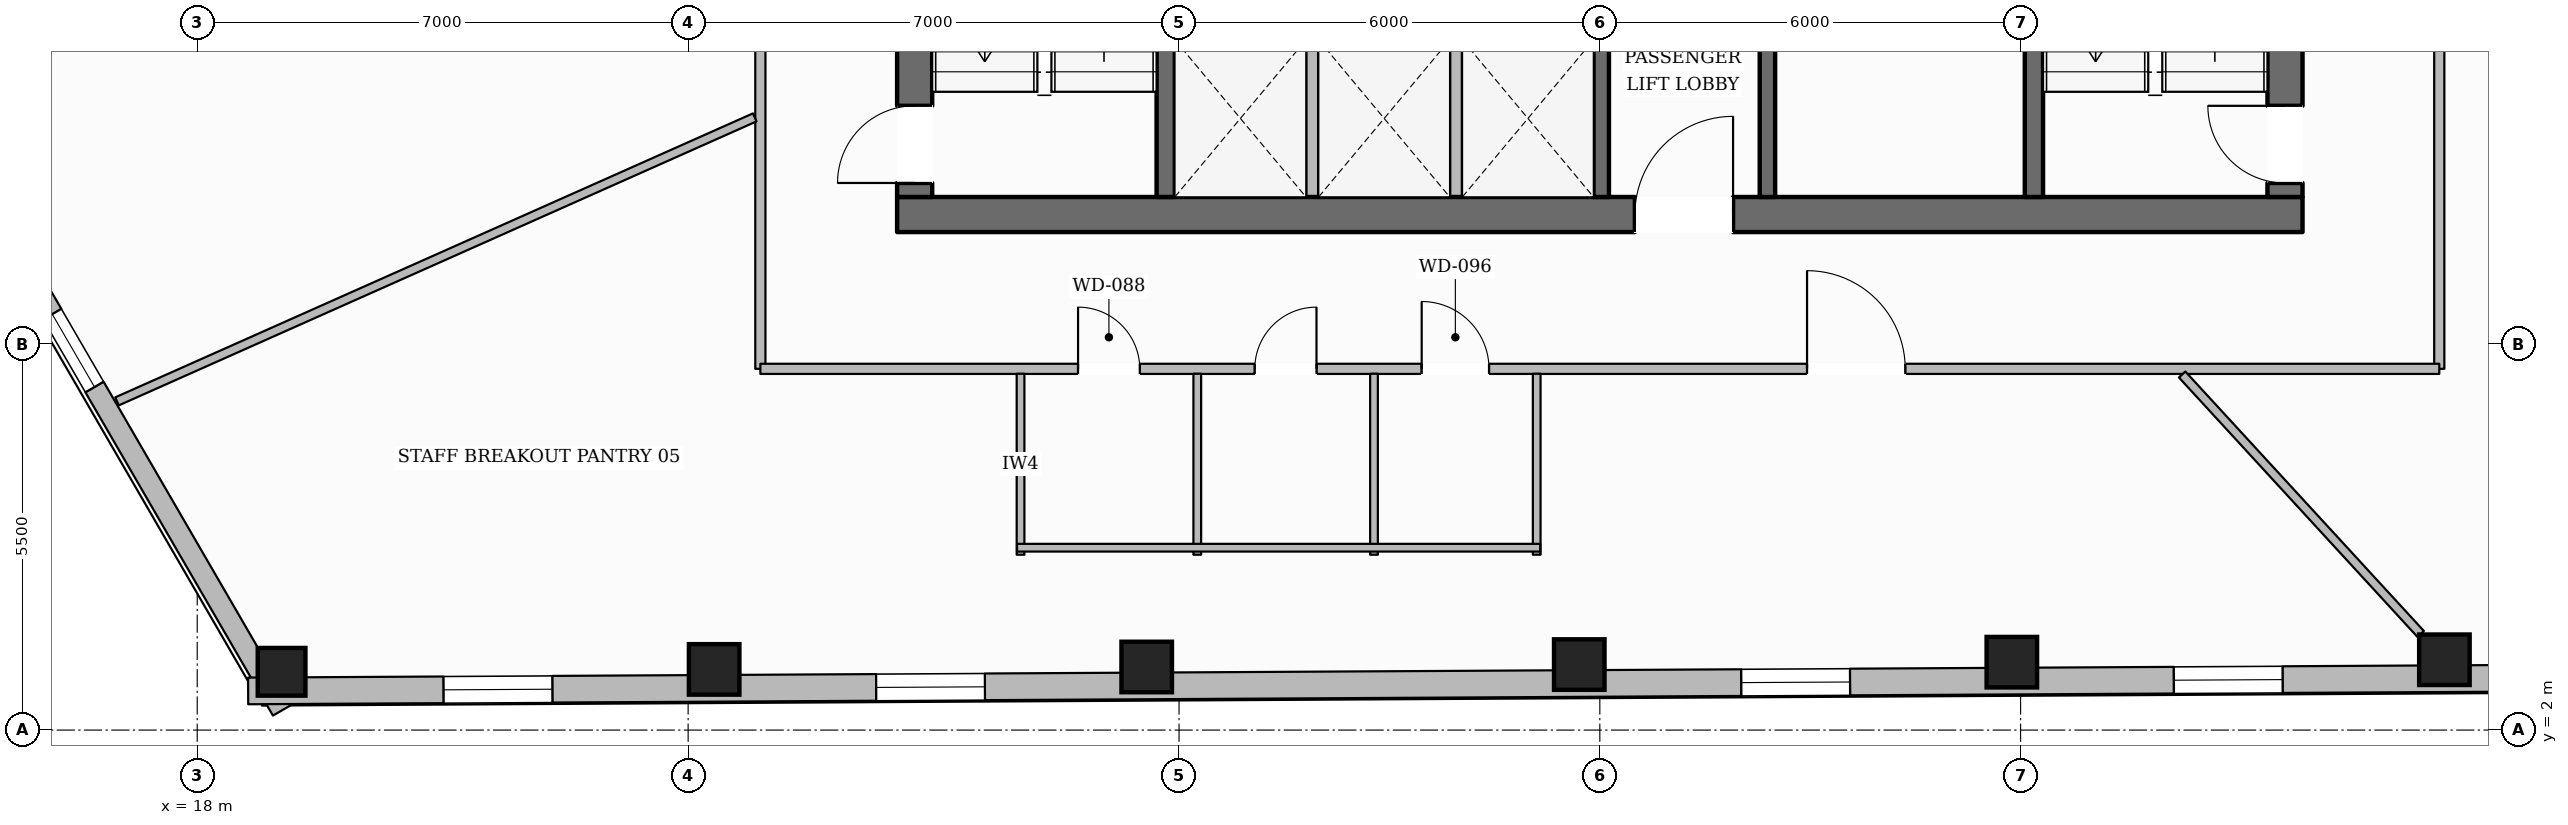
"""IFC4 building model, lengths in metres.
Left out: names, types, materials, properties, quantities, classifications, styles, units other than length and angle.
Written with IfcOpenShell. Run it as: python <this file> out.ifc"""

import sys

from ifc_helpers import new_model, si_unit, direction, frame, frame_2d, origin, origin_2d, place, context, subcontext, project, spatial, rectangle, hollow_rectangle, extrude, element, fill, save


model = new_model("IFC4")
c1 = context("Model", 3, precision=1e-05, world=origin(), true_north=direction((0.0, 1.0)))
c2 = subcontext(c1, "Body", "Model", "MODEL_VIEW")
j1 = project(units=[si_unit("LENGTHUNIT", "METRE"), si_unit("PLANEANGLEUNIT", "RADIAN")], contexts=[c1])
p1 = place(None, origin())
s1 = spatial("IfcSite", under=j1, at=p1, CompositionType="ELEMENT")
p2 = place(p1, origin())
s2 = spatial("IfcBuilding", under=s1, at=p2, CompositionType="ELEMENT")
p3 = place(p2, frame((0.0, 0.0, 139.4)))
s3 = spatial("IfcBuildingStorey", under=s2, at=p3, CompositionType="ELEMENT", Elevation=139.4)
p4 = place(p3, frame((27.98, 9.35, 0.0), z_axis=(0.0, 0.0, 1.0), x_axis=(1.0, 0.0, 0.0)))
e1 = element("IfcWall", 1, at=p4, inside=s3, PredefinedType="SOLIDWALL", context=c2, shape_type="SweptSolid", body=[
    extrude(rectangle(XDim=20.04, YDim=0.5, at=frame_2d((10.02, 0.0))), origin(), (0.0, 0.0, 1.0), 3.6),
])
p5 = place(p4, frame((10.52, 0.0, 0.0)))
e2 = element("IfcOpeningElement", 2, at=p5, cuts=e1, PredefinedType="OPENING", context=c2, shape_type="SweptSolid", body=[
    extrude(rectangle(XDim=1.4, YDim=2.2, at=frame_2d((0.7, 1.1))), frame((0.0, 0.26, 0.0), z_axis=(0.0, -1.0, 0.0), x_axis=(1.0, 0.0, 0.0)), (0.0, 0.0, 1.0), 0.52),
])
p6 = place(p3, frame((28.23, 9.6, 0.0), z_axis=(0.0, 0.0, 1.0), x_axis=(0.0, 1.0, 0.0)))
e3 = element("IfcWall", 3, at=p6, inside=s3, PredefinedType="SOLIDWALL", context=c2, shape_type="SweptSolid", body=[
    extrude(rectangle(XDim=13.0, YDim=0.5, at=frame_2d((6.5, 0.0))), origin(), (0.0, 0.0, 1.0), 3.6),
])
p7 = place(p6, frame((0.2, 0.0, 0.0)))
e4 = element("IfcOpeningElement", 4, at=p7, cuts=e3, PredefinedType="OPENING", context=c2, shape_type="SweptSolid", body=[
    extrude(rectangle(XDim=1.1, YDim=2.15, at=frame_2d((0.55, 1.075))), frame((0.0, 0.26, 0.0), z_axis=(0.0, -1.0, 0.0), x_axis=(1.0, 0.0, 0.0)), (0.0, 0.0, 1.0), 0.52),
])
p8 = place(p6, frame((8.4, 0.0, 0.0)))
e5 = element("IfcOpeningElement", 5, at=p8, cuts=e3, PredefinedType="OPENING", context=c2, shape_type="SweptSolid", body=[
    extrude(rectangle(XDim=0.9, YDim=2.1, at=frame_2d((0.45, 1.05))), frame((0.0, 0.26, 0.0), z_axis=(0.0, -1.0, 0.0), x_axis=(1.0, 0.0, 0.0)), (0.0, 0.0, 1.0), 0.52),
])
p9 = place(p3, frame((47.77, 9.6, 0.0), z_axis=(0.0, 0.0, 1.0), x_axis=(0.0, 1.0, 0.0)))
e6 = element("IfcWall", 6, at=p9, inside=s3, PredefinedType="SOLIDWALL", context=c2, shape_type="SweptSolid", body=[
    extrude(rectangle(XDim=13.0, YDim=0.5, at=frame_2d((6.5, 0.0))), origin(), (0.0, 0.0, 1.0), 3.6),
])
p10 = place(p9, frame((0.2, 0.0, 0.0)))
e7 = element("IfcOpeningElement", 7, at=p10, cuts=e6, PredefinedType="OPENING", context=c2, shape_type="SweptSolid", body=[
    extrude(rectangle(XDim=1.1, YDim=2.15, at=frame_2d((0.55, 1.075))), frame((0.0, 0.26, 0.0), z_axis=(0.0, -1.0, 0.0), x_axis=(1.0, 0.0, 0.0)), (0.0, 0.0, 1.0), 0.52),
])
p11 = place(p9, frame((8.4, 0.0, 0.0)))
e8 = element("IfcOpeningElement", 8, at=p11, cuts=e6, PredefinedType="OPENING", context=c2, shape_type="SweptSolid", body=[
    extrude(rectangle(XDim=0.9, YDim=2.1, at=frame_2d((0.45, 1.05))), frame((0.0, 0.26, 0.0), z_axis=(0.0, -1.0, 0.0), x_axis=(1.0, 0.0, 0.0)), (0.0, 0.0, 1.0), 0.52),
])
p12 = place(p3, frame((31.81, 9.6, 0.0), z_axis=(0.0, 0.0, 1.0), x_axis=(0.0, 1.0, 0.0)))
e9 = element("IfcWall", 9, at=p12, inside=s3, PredefinedType="SHEAR", context=c2, shape_type="SweptSolid", body=[
    extrude(rectangle(XDim=13.0, YDim=0.26, at=frame_2d((6.5, 0.0))), origin(), (0.0, 0.0, 1.0), 3.6),
])
p13 = place(p12, frame((10.925, 0.0, 0.0)))
e10 = element("IfcOpeningElement", 10, at=p13, cuts=e9, PredefinedType="OPENING", context=c2, shape_type="SweptSolid", body=[
    extrude(rectangle(XDim=1.25, YDim=2.25, at=frame_2d((0.625, 1.125))), frame((0.0, 0.14, 0.0), z_axis=(0.0, -1.0, 0.0), x_axis=(1.0, 0.0, 0.0)), (0.0, 0.0, 1.0), 0.28),
])
p14 = place(p3, frame((44.19, 9.6, 0.0), z_axis=(0.0, 0.0, 1.0), x_axis=(0.0, 1.0, 0.0)))
e11 = element("IfcWall", 11, at=p14, inside=s3, PredefinedType="SHEAR", context=c2, shape_type="SweptSolid", body=[
    extrude(rectangle(XDim=13.0, YDim=0.26, at=frame_2d((6.5, 0.0))), origin(), (0.0, 0.0, 1.0), 3.6),
])
p15 = place(p14, frame((10.925, 0.0, 0.0)))
e12 = element("IfcOpeningElement", 12, at=p15, cuts=e11, PredefinedType="OPENING", context=c2, shape_type="SweptSolid", body=[
    extrude(rectangle(XDim=1.25, YDim=2.25, at=frame_2d((0.625, 1.125))), frame((0.0, 0.14, 0.0), z_axis=(0.0, -1.0, 0.0), x_axis=(1.0, 0.0, 0.0)), (0.0, 0.0, 1.0), 0.28),
])
for number, where, z_axis, x_axis in (
    (13, (38.02, 9.6, 0.0), (0.0, 0.0, 1.0), (0.0, 1.0, 0.0)),
    (14, (40.39, 9.6, 0.0), (0.0, 0.0, 1.0), (0.0, 1.0, 0.0)),
):
    element("IfcWall", number, at=place(p3, frame(where, z_axis=z_axis, x_axis=x_axis)), inside=s3, PredefinedType="SOLIDWALL", context=c2, shape_type="SweptSolid", body=[
        extrude(rectangle(XDim=2.24, YDim=0.22, at=frame_2d((1.12, 0.0))), origin(), (0.0, 0.0, 1.0), 3.6),
    ])
p16 = place(p3, frame((19.203, 2.831, 0.0), z_axis=(0.0, 0.0, 1.0), x_axis=(1.0, 0.0, 0.0)))
e15 = element("IfcColumn", 15, at=p16, inside=s3, PredefinedType="COLUMN", context=c2, shape_type="SweptSolid", body=[
    extrude(hollow_rectangle(XDim=0.68, YDim=0.68, WallThickness=0.03, at=origin_2d()), origin(), (0.0, 0.0, 1.0), 3.6),
])
for number, where, z_axis, x_axis in (
    (16, (25.371, 2.865, 0.0), (0.0, 0.0, 1.0), (1.0, 0.0, 0.0)),
    (17, (31.539, 2.899, 0.0), (0.0, 0.0, 1.0), (1.0, 0.0, 0.0)),
    (18, (37.707, 2.934, 0.0), (0.0, 0.0, 1.0), (1.0, 0.0, 0.0)),
    (19, (43.875, 2.968, 0.0), (0.0, 0.0, 1.0), (1.0, 0.0, 0.0)),
    (20, (50.043, 3.002, 0.0), (0.0, 0.0, 1.0), (1.0, 0.0, 0.0)),
):
    element("IfcColumn", number, at=place(p3, frame(where, z_axis=z_axis, x_axis=x_axis)), inside=s3, PredefinedType="COLUMN", context=c2, shape_type="SweptSolid", body=[
        extrude(hollow_rectangle(XDim=0.72, YDim=0.72, WallThickness=0.032, at=origin_2d()), origin(), (0.0, 0.0, 1.0), 3.6),
    ])
p17 = place(p3, frame((19.209, 2.282, 0.0), z_axis=(0.0, 0.0, 1.0), x_axis=(-0.501777863024, 0.864996518016, 0.0)))
e21 = element("IfcWall", 21, at=p17, inside=s3, PredefinedType="STANDARD", context=c2, shape_type="SweptSolid", body=[
    extrude(rectangle(XDim=11.858, YDim=0.3, at=frame_2d((5.929, 0.0))), origin(), (0.0, 0.0, 1.0), 3.059),
])
p18 = place(p17, frame((5.329, 0.0, 0.65)))
e22 = element("IfcOpeningElement", 22, at=p18, cuts=e21, PredefinedType="OPENING", context=c2, shape_type="SweptSolid", body=[
    extrude(rectangle(XDim=1.2, YDim=1.7, at=frame_2d((0.6, 0.85))), frame((0.0, 0.16, 0.0), z_axis=(0.0, -1.0, 0.0), x_axis=(1.0, 0.0, 0.0)), (0.0, 0.0, 1.0), 0.32),
])
p19 = place(p3, frame((56.686, 2.769, 0.0), z_axis=(0.0, 0.0, 1.0), x_axis=(-0.999984524956, -0.00556325886, 0.0)))
e23 = element("IfcWall", 23, at=p19, inside=s3, PredefinedType="STANDARD", context=c2, shape_type="SweptSolid", body=[
    extrude(rectangle(XDim=37.96, YDim=0.38, at=frame_2d((18.98, 0.0))), origin(), (0.0, 0.0, 1.0), 3.059),
])
p20 = place(p19, frame((33.623, 0.0, 0.65)))
e24 = element("IfcOpeningElement", 24, at=p20, cuts=e23, PredefinedType="OPENING", context=c2, shape_type="SweptSolid", body=[
    extrude(rectangle(XDim=1.55, YDim=1.75, at=frame_2d((0.775, 0.875))), frame((0.0, 0.2, 0.0), z_axis=(0.0, -1.0, 0.0), x_axis=(1.0, 0.0, 0.0)), (0.0, 0.0, 1.0), 0.4),
])
p21 = place(p19, frame((27.455, 0.0, 0.65)))
e25 = element("IfcOpeningElement", 25, at=p21, cuts=e23, PredefinedType="OPENING", context=c2, shape_type="SweptSolid", body=[
    extrude(rectangle(XDim=1.55, YDim=1.75, at=frame_2d((0.775, 0.875))), frame((0.0, 0.2, 0.0), z_axis=(0.0, -1.0, 0.0), x_axis=(1.0, 0.0, 0.0)), (0.0, 0.0, 1.0), 0.4),
])
p22 = place(p19, frame((15.118, 0.0, 0.65)))
e26 = element("IfcOpeningElement", 26, at=p22, cuts=e23, PredefinedType="OPENING", context=c2, shape_type="SweptSolid", body=[
    extrude(rectangle(XDim=1.55, YDim=1.75, at=frame_2d((0.775, 0.875))), frame((0.0, 0.2, 0.0), z_axis=(0.0, -1.0, 0.0), x_axis=(1.0, 0.0, 0.0)), (0.0, 0.0, 1.0), 0.4),
])
p23 = place(p19, frame((8.95, 0.0, 0.65)))
e27 = element("IfcOpeningElement", 27, at=p23, cuts=e23, PredefinedType="OPENING", context=c2, shape_type="SweptSolid", body=[
    extrude(rectangle(XDim=1.55, YDim=1.75, at=frame_2d((0.775, 0.875))), frame((0.0, 0.2, 0.0), z_axis=(0.0, -1.0, 0.0), x_axis=(1.0, 0.0, 0.0)), (0.0, 0.0, 1.0), 0.4),
])
p24 = place(p19, frame((2.782, 0.0, 0.65)))
e28 = element("IfcOpeningElement", 28, at=p24, cuts=e23, PredefinedType="OPENING", context=c2, shape_type="SweptSolid", body=[
    extrude(rectangle(XDim=1.55, YDim=1.75, at=frame_2d((0.775, 0.875))), frame((0.0, 0.2, 0.0), z_axis=(0.0, -1.0, 0.0), x_axis=(1.0, 0.0, 0.0)), (0.0, 0.0, 1.0), 0.4),
])
for number, where, z_axis, x_axis in (
    (29, (33.9, 9.55, 0.0), (0.0, 0.0, 1.0), (0.0, 1.0, 0.0)),
    (30, (35.95, 9.55, 0.0), (0.0, 0.0, 1.0), (0.0, 1.0, 0.0)),
):
    element("IfcWall", number, at=place(p3, frame(where, z_axis=z_axis, x_axis=x_axis)), inside=s3, PredefinedType="PARTITIONING", context=c2, shape_type="SweptSolid", body=[
        extrude(rectangle(XDim=2.29, YDim=0.165, at=frame_2d((1.145, 0.0))), origin(), (0.0, 0.0, 1.0), 3.6),
    ])
p25 = place(p3, frame((49.97, 7.15, 0.0), z_axis=(0.0, 0.0, 1.0), x_axis=(0.0, 1.0, 0.0)))
e31 = element("IfcWall", 31, at=p25, inside=s3, PredefinedType="PARTITIONING", context=c2, shape_type="SweptSolid", body=[
    extrude(rectangle(XDim=17.9, YDim=0.145, at=frame_2d((8.95, 0.0))), origin(), (0.0, 0.0, 1.0), 3.288),
])
p26 = place(p25, frame((6.23, 0.0, 0.0)))
e32 = element("IfcOpeningElement", 32, at=p26, cuts=e31, PredefinedType="OPENING", context=c2, shape_type="SweptSolid", body=[
    extrude(rectangle(XDim=1.4, YDim=2.2, at=frame_2d((0.7, 1.1))), frame((0.0, 0.083, 0.0), z_axis=(0.0, -1.0, 0.0), x_axis=(1.0, 0.0, 0.0)), (0.0, 0.0, 1.0), 0.165),
])
p27 = place(p3, frame((26.03, 25.05, 0.0), z_axis=(0.0, 0.0, 1.0), x_axis=(0.0, -1.0, 0.0)))
e33 = element("IfcWall", 33, at=p27, inside=s3, PredefinedType="PARTITIONING", context=c2, shape_type="SweptSolid", body=[
    extrude(rectangle(XDim=17.9, YDim=0.145, at=frame_2d((8.95, 0.0))), origin(), (0.0, 0.0, 1.0), 3.288),
])
p28 = place(p27, frame((8.676, 0.0, 0.0)))
e34 = element("IfcOpeningElement", 34, at=p28, cuts=e33, PredefinedType="OPENING", context=c2, shape_type="SweptSolid", body=[
    extrude(rectangle(XDim=1.4, YDim=2.2, at=frame_2d((0.7, 1.1))), frame((0.0, 0.083, 0.0), z_axis=(0.0, -1.0, 0.0), x_axis=(1.0, 0.0, 0.0)), (0.0, 0.0, 1.0), 0.165),
])
p29 = place(p3, frame((26.03, 7.15, 0.0), z_axis=(0.0, 0.0, 1.0), x_axis=(1.0, 0.0, 0.0)))
e35 = element("IfcWall", 35, at=p29, inside=s3, PredefinedType="PARTITIONING", context=c2, shape_type="SweptSolid", body=[
    extrude(rectangle(XDim=23.94, YDim=0.145, at=frame_2d((11.97, 0.0))), origin(), (0.0, 0.0, 1.0), 3.6),
])
p30 = place(p29, frame((4.53, 0.0, 0.0)))
e36 = element("IfcOpeningElement", 36, at=p30, cuts=e35, PredefinedType="OPENING", context=c2, shape_type="SweptSolid", body=[
    extrude(rectangle(XDim=0.88, YDim=2.1, at=frame_2d((0.44, 1.05))), frame((0.0, 0.083, 0.0), z_axis=(0.0, -1.0, 0.0), x_axis=(1.0, 0.0, 0.0)), (0.0, 0.0, 1.0), 0.165),
])
p31 = place(p29, frame((7.05, 0.0, 0.0)))
e37 = element("IfcOpeningElement", 37, at=p31, cuts=e35, PredefinedType="OPENING", context=c2, shape_type="SweptSolid", body=[
    extrude(rectangle(XDim=0.88, YDim=2.1, at=frame_2d((0.44, 1.05))), frame((0.0, 0.083, 0.0), z_axis=(0.0, -1.0, 0.0), x_axis=(1.0, 0.0, 0.0)), (0.0, 0.0, 1.0), 0.165),
])
p32 = place(p29, frame((9.43, 0.0, 0.0)))
e38 = element("IfcOpeningElement", 38, at=p32, cuts=e35, PredefinedType="OPENING", context=c2, shape_type="SweptSolid", body=[
    extrude(rectangle(XDim=0.96, YDim=2.1, at=frame_2d((0.48, 1.05))), frame((0.0, 0.083, 0.0), z_axis=(0.0, -1.0, 0.0), x_axis=(1.0, 0.0, 0.0)), (0.0, 0.0, 1.0), 0.165),
])
p33 = place(p29, frame((14.925, 0.0, 0.0)))
e39 = element("IfcOpeningElement", 39, at=p33, cuts=e35, PredefinedType="OPENING", context=c2, shape_type="SweptSolid", body=[
    extrude(rectangle(XDim=1.4, YDim=2.2, at=frame_2d((0.7, 1.1))), frame((0.0, 0.083, 0.0), z_axis=(0.0, -1.0, 0.0), x_axis=(1.0, 0.0, 0.0)), (0.0, 0.0, 1.0), 0.165),
])
for number, where, z_axis, x_axis in (
    (40, (29.74, 4.5, 0.0), (0.0, 0.0, 1.0), (0.0, 1.0, 0.0)),
    (41, (32.26, 4.5, 0.0), (0.0, 0.0, 1.0), (0.0, 1.0, 0.0)),
    (42, (34.78, 4.5, 0.0), (0.0, 0.0, 1.0), (0.0, 1.0, 0.0)),
    (43, (37.1, 4.5, 0.0), (0.0, 0.0, 1.0), (0.0, 1.0, 0.0)),
):
    element("IfcWall", number, at=place(p3, frame(where, z_axis=z_axis, x_axis=x_axis)), inside=s3, PredefinedType="PLUMBINGWALL", context=c2, shape_type="SweptSolid", body=[
        extrude(rectangle(XDim=2.58, YDim=0.11, at=frame_2d((1.29, 0.0))), origin(), (0.0, 0.0, 1.0), 3.6),
    ])
p34 = place(p3, frame((29.69, 4.6, 0.0), z_axis=(0.0, 0.0, 1.0), x_axis=(1.0, 0.0, 0.0)))
e44 = element("IfcWall", 44, at=p34, inside=s3, PredefinedType="PLUMBINGWALL", context=c2, shape_type="SweptSolid", body=[
    extrude(rectangle(XDim=7.46, YDim=0.11, at=frame_2d((3.73, 0.0))), origin(), (0.0, 0.0, 1.0), 3.6),
])
p35 = place(p3, frame((25.949, 10.735, 0.0), z_axis=(0.0, 0.0, 1.0), x_axis=(-0.913541286937, -0.406746010505, 0.0)))
e45 = element("IfcWall", 45, at=p35, inside=s3, PredefinedType="PARTITIONING", context=c2, shape_type="SweptSolid", body=[
    extrude(rectangle(XDim=9.954, YDim=0.125, at=frame_2d((4.977, 0.0))), origin(), (0.0, 0.0, 1.0), 3.6),
])
p36 = place(p3, frame((46.303, 7.07, 0.0), z_axis=(0.0, 0.0, 1.0), x_axis=(0.676848098588, -0.736122714931, 0.0)))
e46 = element("IfcWall", 46, at=p36, inside=s3, PredefinedType="PARTITIONING", context=c2, shape_type="SweptSolid", body=[
    extrude(rectangle(XDim=5.025, YDim=0.125, at=frame_2d((2.512, 0.0))), origin(), (0.0, 0.0, 1.0), 3.6),
])
p37 = place(p20, origin())
e47 = element("IfcWindow", 47, at=p37, inside=s3, PartitioningType="SINGLE_PANEL", PredefinedType="WINDOW", context=c2, shape_type="SweptSolid", body=[
    extrude(rectangle(XDim=1.55, YDim=1.75, at=frame_2d((0.775, 0.875))), frame((0.0, 0.03, 0.0), z_axis=(0.0, -1.0, 0.0), x_axis=(1.0, 0.0, 0.0)), (0.0, 0.0, 1.0), 0.06),
])
fill(e24, e47)
p38 = place(p21, origin())
e48 = element("IfcWindow", 48, at=p38, inside=s3, PartitioningType="SINGLE_PANEL", PredefinedType="WINDOW", context=c2, shape_type="SweptSolid", body=[
    extrude(rectangle(XDim=1.55, YDim=1.75, at=frame_2d((0.775, 0.875))), frame((0.0, 0.03, 0.0), z_axis=(0.0, -1.0, 0.0), x_axis=(1.0, 0.0, 0.0)), (0.0, 0.0, 1.0), 0.06),
])
fill(e25, e48)
p39 = place(p22, origin())
e49 = element("IfcWindow", 49, at=p39, inside=s3, PartitioningType="SINGLE_PANEL", PredefinedType="WINDOW", context=c2, shape_type="SweptSolid", body=[
    extrude(rectangle(XDim=1.55, YDim=1.75, at=frame_2d((0.775, 0.875))), frame((0.0, 0.03, 0.0), z_axis=(0.0, -1.0, 0.0), x_axis=(1.0, 0.0, 0.0)), (0.0, 0.0, 1.0), 0.06),
])
fill(e26, e49)
p40 = place(p23, origin())
e50 = element("IfcWindow", 50, at=p40, inside=s3, PartitioningType="SINGLE_PANEL", PredefinedType="WINDOW", context=c2, shape_type="SweptSolid", body=[
    extrude(rectangle(XDim=1.55, YDim=1.75, at=frame_2d((0.775, 0.875))), frame((0.0, 0.03, 0.0), z_axis=(0.0, -1.0, 0.0), x_axis=(1.0, 0.0, 0.0)), (0.0, 0.0, 1.0), 0.06),
])
fill(e27, e50)
p41 = place(p18, origin())
e51 = element("IfcWindow", 51, at=p41, inside=s3, PartitioningType="SINGLE_PANEL", PredefinedType="WINDOW", context=c2, shape_type="SweptSolid", body=[
    extrude(rectangle(XDim=1.2, YDim=1.7, at=frame_2d((0.6, 0.85))), frame((0.0, 0.03, 0.0), z_axis=(0.0, -1.0, 0.0), x_axis=(1.0, 0.0, 0.0)), (0.0, 0.0, 1.0), 0.06),
])
fill(e22, e51)
p42 = place(p7, origin())
e52 = element("IfcDoor", 52, at=p42, inside=s3, OperationType="SINGLE_SWING_LEFT", PredefinedType="DOOR", context=c2, shape_type="SweptSolid", body=[
    extrude(rectangle(XDim=1.1, YDim=2.15, at=frame_2d((0.55, 1.075))), frame((0.0, 0.025, 0.0), z_axis=(0.0, -1.0, 0.0), x_axis=(1.0, 0.0, 0.0)), (0.0, 0.0, 1.0), 0.05),
])
fill(e4, e52)
p43 = place(p10, origin())
e53 = element("IfcDoor", 53, at=p43, inside=s3, OperationType="SINGLE_SWING_RIGHT", PredefinedType="DOOR", context=c2, shape_type="SweptSolid", body=[
    extrude(rectangle(XDim=1.1, YDim=2.15, at=frame_2d((0.55, 1.075))), frame((0.0, 0.025, 0.0), z_axis=(0.0, -1.0, 0.0), x_axis=(1.0, 0.0, 0.0)), (0.0, 0.0, 1.0), 0.05),
])
fill(e7, e53)
p44 = place(p5, origin())
e54 = element("IfcDoor", 54, at=p44, inside=s3, OperationType="SINGLE_SWING_RIGHT", PredefinedType="DOOR", context=c2, shape_type="SweptSolid", body=[
    extrude(rectangle(XDim=1.4, YDim=2.2, at=frame_2d((0.7, 1.1))), frame((0.0, 0.025, 0.0), z_axis=(0.0, -1.0, 0.0), x_axis=(1.0, 0.0, 0.0)), (0.0, 0.0, 1.0), 0.05),
])
fill(e2, e54)
p45 = place(p30, origin())
e55 = element("IfcDoor", 55, at=p45, inside=s3, OperationType="SINGLE_SWING_LEFT", PredefinedType="DOOR", context=c2, shape_type="SweptSolid", body=[
    extrude(rectangle(XDim=0.88, YDim=2.1, at=frame_2d((0.44, 1.05))), frame((0.0, 0.025, 0.0), z_axis=(0.0, -1.0, 0.0), x_axis=(1.0, 0.0, 0.0)), (0.0, 0.0, 1.0), 0.05),
])
fill(e36, e55)
p46 = place(p31, origin())
e56 = element("IfcDoor", 56, at=p46, inside=s3, OperationType="SINGLE_SWING_RIGHT", PredefinedType="DOOR", context=c2, shape_type="SweptSolid", body=[
    extrude(rectangle(XDim=0.88, YDim=2.1, at=frame_2d((0.44, 1.05))), frame((0.0, 0.025, 0.0), z_axis=(0.0, -1.0, 0.0), x_axis=(1.0, 0.0, 0.0)), (0.0, 0.0, 1.0), 0.05),
])
fill(e37, e56)
p47 = place(p32, origin())
e57 = element("IfcDoor", 57, at=p47, inside=s3, OperationType="SINGLE_SWING_LEFT", PredefinedType="DOOR", context=c2, shape_type="SweptSolid", body=[
    extrude(rectangle(XDim=0.96, YDim=2.1, at=frame_2d((0.48, 1.05))), frame((0.0, 0.025, 0.0), z_axis=(0.0, -1.0, 0.0), x_axis=(1.0, 0.0, 0.0)), (0.0, 0.0, 1.0), 0.05),
])
fill(e38, e57)
p48 = place(p33, origin())
e58 = element("IfcDoor", 58, at=p48, inside=s3, OperationType="SINGLE_SWING_LEFT", PredefinedType="DOOR", context=c2, shape_type="SweptSolid", body=[
    extrude(rectangle(XDim=1.4, YDim=2.2, at=frame_2d((0.7, 1.1))), frame((0.0, 0.025, 0.0), z_axis=(0.0, -1.0, 0.0), x_axis=(1.0, 0.0, 0.0)), (0.0, 0.0, 1.0), 0.05),
])
fill(e39, e58)
save(model, sys.argv[1])
